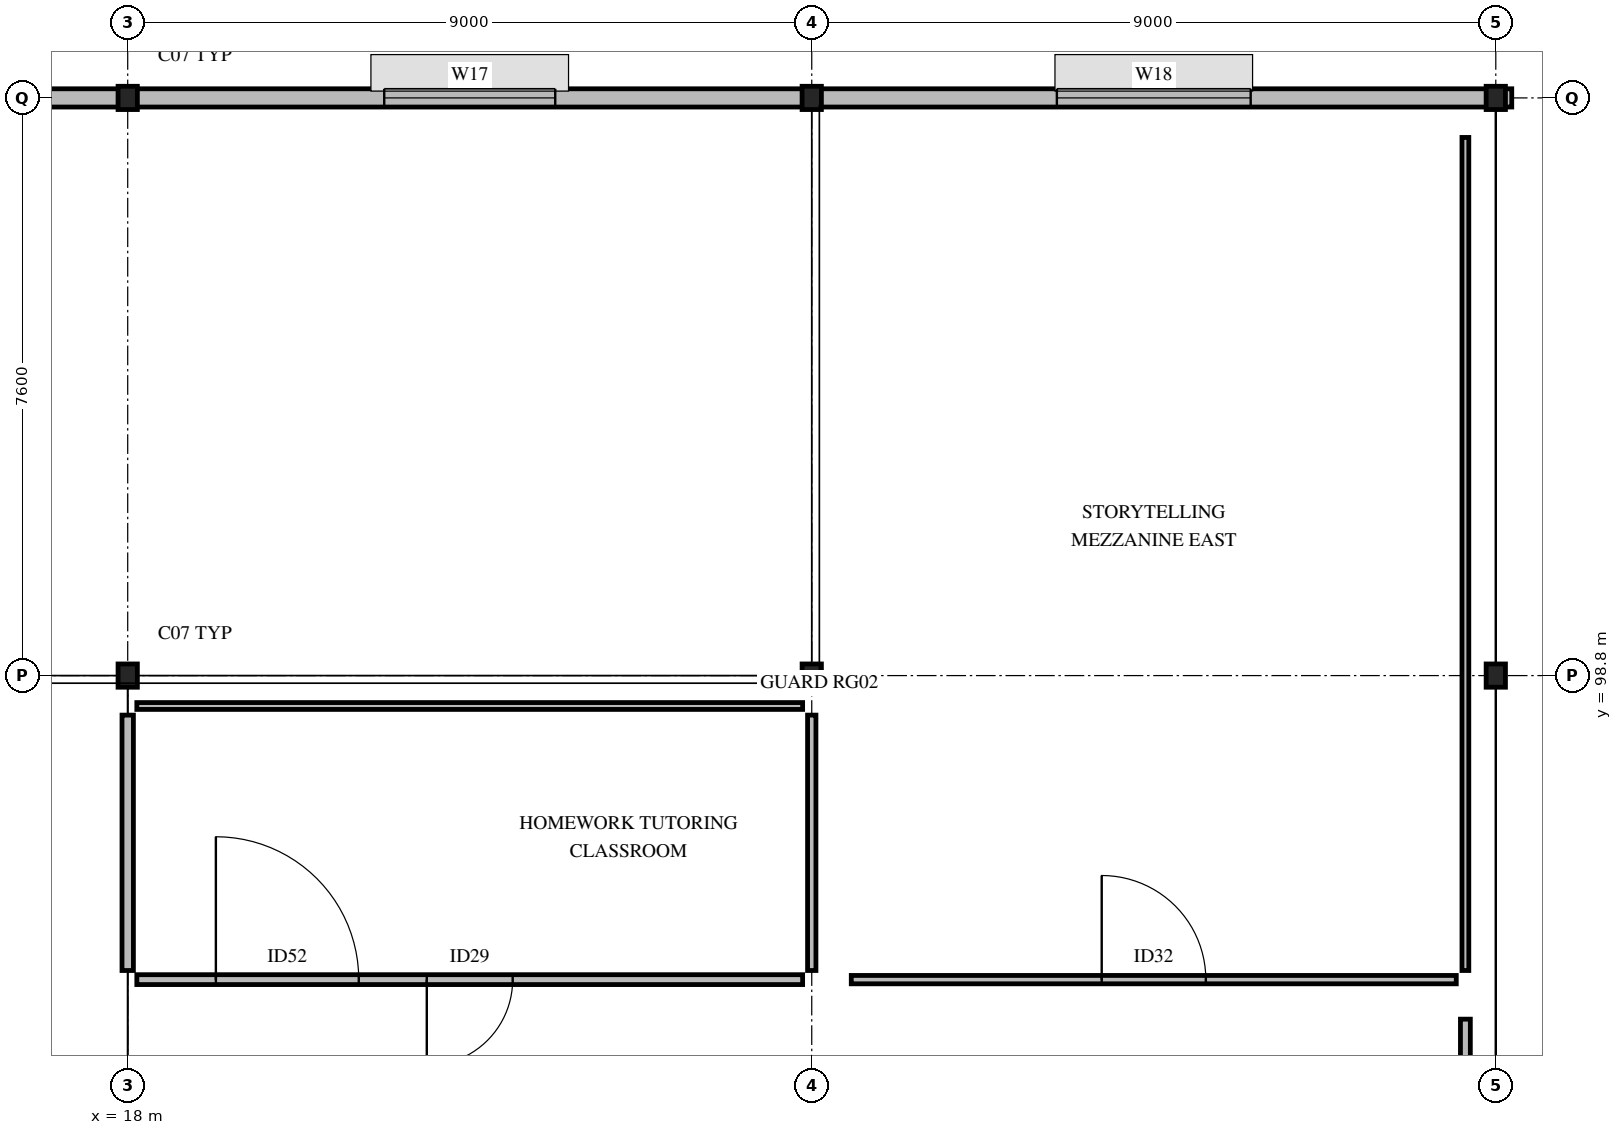
"""IFC4 building model, lengths in metres.
Left out: names, types, materials, properties, quantities, classifications, styles, units other than length and angle.
Written with IfcOpenShell. Run it as: python <this file> out.ifc"""

import sys

from ifc_helpers import new_model, si_unit, direction, frame, frame_2d, origin, origin_2d, place, context, subcontext, project, spatial, rectangle, i_section, extrude, element, fill, save


model = new_model("IFC4")
c1 = context("Model", 3, precision=1e-05, world=origin(), true_north=direction((0.0, 1.0)))
c2 = subcontext(c1, "Body", "Model", "MODEL_VIEW")
j1 = project(units=[si_unit("LENGTHUNIT", "METRE"), si_unit("PLANEANGLEUNIT", "RADIAN")], contexts=[c1])
p1 = place(None, origin())
s1 = spatial("IfcSite", under=j1, at=p1, CompositionType="ELEMENT")
p2 = place(p1, origin())
s2 = spatial("IfcBuilding", under=s1, at=p2, CompositionType="ELEMENT")
p3 = place(p2, frame((0.0, 0.0, 5.04)))
s3 = spatial("IfcBuildingStorey", under=s2, at=p3, CompositionType="ELEMENT", Elevation=5.04)
for number, where, z_axis, x_axis in (
    (1, (18.0, 98.8, 0.0), (0.0, 0.0, 1.0), (1.0, 0.0, 0.0)),
    (2, (18.0, 106.4, 0.0), (0.0, 0.0, 1.0), (1.0, 0.0, 0.0)),
    (3, (27.0, 98.8, 0.0), (0.0, 0.0, 1.0), (1.0, 0.0, 0.0)),
    (4, (27.0, 106.4, 0.0), (0.0, 0.0, 1.0), (1.0, 0.0, 0.0)),
    (5, (36.0, 98.8, 0.0), (0.0, 0.0, 1.0), (1.0, 0.0, 0.0)),
    (6, (36.0, 106.4, 0.0), (0.0, 0.0, 1.0), (1.0, 0.0, 0.0)),
):
    element("IfcColumn", number, at=place(p3, frame(where, z_axis=z_axis, x_axis=x_axis)), inside=s3, PredefinedType="COLUMN", context=c2, shape_type="SweptSolid", body=[
        extrude(i_section(OverallWidth=0.254, OverallDepth=0.306, WebThickness=0.009, FlangeThickness=0.015, FilletRadius=0.015, at=origin_2d()), origin(), (0.0, 0.0, 1.0), 4.32),
    ])
p4 = place(p3, frame((9.0, 106.4, 0.0), z_axis=(0.0, 0.0, 1.0), x_axis=(1.0, 0.0, 0.0)))
e7 = element("IfcWall", 7, at=p4, inside=s3, PredefinedType="STANDARD", context=c2, shape_type="SweptSolid", body=[
    extrude(rectangle(XDim=9.0, YDim=0.24, at=frame_2d((4.5, 0.0))), origin(), (0.0, 0.0, 1.0), 4.08),
])
p5 = place(p4, frame((3.525, 0.0, 0.85)))
e8 = element("IfcOpeningElement", 8, at=p5, cuts=e7, PredefinedType="OPENING", context=c2, shape_type="SweptSolid", body=[
    extrude(rectangle(XDim=1.95, YDim=1.35, at=frame_2d((0.975, 0.675))), frame((0.0, 0.13, 0.0), z_axis=(0.0, -1.0, 0.0), x_axis=(1.0, 0.0, 0.0)), (0.0, 0.0, 1.0), 0.26),
])
p6 = place(p3, frame((18.0, 106.4, 0.0), z_axis=(0.0, 0.0, 1.0), x_axis=(1.0, 0.0, 0.0)))
e9 = element("IfcWall", 9, at=p6, inside=s3, PredefinedType="STANDARD", context=c2, shape_type="SweptSolid", body=[
    extrude(rectangle(XDim=9.0, YDim=0.24, at=frame_2d((4.5, 0.0))), origin(), (0.0, 0.0, 1.0), 4.08),
])
p7 = place(p6, frame((3.375, 0.0, 0.85)))
e10 = element("IfcOpeningElement", 10, at=p7, cuts=e9, PredefinedType="OPENING", context=c2, shape_type="SweptSolid", body=[
    extrude(rectangle(XDim=2.25, YDim=1.35, at=frame_2d((1.125, 0.675))), frame((0.0, 0.13, 0.0), z_axis=(0.0, -1.0, 0.0), x_axis=(1.0, 0.0, 0.0)), (0.0, 0.0, 1.0), 0.26),
])
p8 = place(p3, frame((27.0, 106.4, 0.0), z_axis=(0.0, 0.0, 1.0), x_axis=(1.0, 0.0, 0.0)))
e11 = element("IfcWall", 11, at=p8, inside=s3, PredefinedType="STANDARD", context=c2, shape_type="SweptSolid", body=[
    extrude(rectangle(XDim=9.21, YDim=0.24, at=frame_2d((4.605, 0.0))), origin(), (0.0, 0.0, 1.0), 4.08),
])
p9 = place(p8, frame((3.225, 0.0, 0.85)))
e12 = element("IfcOpeningElement", 12, at=p9, cuts=e11, PredefinedType="OPENING", context=c2, shape_type="SweptSolid", body=[
    extrude(rectangle(XDim=2.55, YDim=1.35, at=frame_2d((1.275, 0.675))), frame((0.0, 0.13, 0.0), z_axis=(0.0, -1.0, 0.0), x_axis=(1.0, 0.0, 0.0)), (0.0, 0.0, 1.0), 0.26),
])
p10 = place(p3, frame((18.12, 94.8, 0.0), z_axis=(0.0, 0.0, 1.0), x_axis=(1.0, 0.0, 0.0)))
e13 = element("IfcWall", 13, at=p10, inside=s3, PredefinedType="PARTITIONING", context=c2, shape_type="SweptSolid", body=[
    extrude(rectangle(XDim=8.76, YDim=0.13, at=frame_2d((4.38, 0.0))), origin(), (0.0, 0.0, 1.0), 4.04),
])
p11 = place(p10, frame((3.815, 0.0, 0.0)))
e14 = element("IfcOpeningElement", 14, at=p11, cuts=e13, PredefinedType="OPENING", context=c2, shape_type="SweptSolid", body=[
    extrude(rectangle(XDim=1.13, YDim=2.15, at=frame_2d((0.565, 1.075))), frame((0.0, 0.075, 0.0), z_axis=(0.0, -1.0, 0.0), x_axis=(1.0, 0.0, 0.0)), (0.0, 0.0, 1.0), 0.15),
])
p12 = place(p10, frame((1.04, 0.0, 0.0)))
e15 = element("IfcOpeningElement", 15, at=p12, cuts=e13, PredefinedType="OPENING", context=c2, shape_type="SweptSolid", body=[
    extrude(rectangle(XDim=1.88, YDim=2.2, at=frame_2d((0.94, 1.1))), frame((0.0, 0.075, 0.0), z_axis=(0.0, -1.0, 0.0), x_axis=(1.0, 0.0, 0.0)), (0.0, 0.0, 1.0), 0.15),
])
p13 = place(p3, frame((27.0, 94.92, 0.0), z_axis=(0.0, 0.0, 1.0), x_axis=(0.0, 1.0, 0.0)))
e16 = element("IfcWall", 16, at=p13, inside=s3, PredefinedType="PARTITIONING", context=c2, shape_type="SweptSolid", body=[
    extrude(rectangle(XDim=3.36, YDim=0.11, at=frame_2d((1.68, 0.0))), origin(), (0.0, 0.0, 1.0), 3.659),
])
p14 = place(p3, frame((18.12, 98.4, 0.0), z_axis=(0.0, 0.0, 1.0), x_axis=(1.0, 0.0, 0.0)))
e17 = element("IfcWall", 17, at=p14, inside=s3, PredefinedType="PARTITIONING", context=c2, shape_type="SweptSolid", body=[
    extrude(rectangle(XDim=8.76, YDim=0.09, at=frame_2d((4.38, 0.0))), origin(), (0.0, 0.0, 1.0), 4.04),
])
p15 = place(p3, frame((18.0, 94.92, 0.0), z_axis=(0.0, 0.0, 1.0), x_axis=(0.0, 1.0, 0.0)))
e18 = element("IfcWall", 18, at=p15, inside=s3, PredefinedType="PARTITIONING", context=c2, shape_type="SweptSolid", body=[
    extrude(rectangle(XDim=3.36, YDim=0.15, at=frame_2d((1.68, 0.0))), origin(), (0.0, 0.0, 1.0), 3.659),
])
p16 = place(p3, frame((27.52, 94.8, 0.0), z_axis=(0.0, 0.0, 1.0), x_axis=(1.0, 0.0, 0.0)))
e19 = element("IfcWall", 19, at=p16, inside=s3, PredefinedType="PARTITIONING", context=c2, shape_type="SweptSolid", body=[
    extrude(rectangle(XDim=7.96, YDim=0.11, at=frame_2d((3.98, 0.0))), origin(), (0.0, 0.0, 1.0), 4.04),
])
p17 = place(p16, frame((3.295, 0.0, 0.0)))
e20 = element("IfcOpeningElement", 20, at=p17, cuts=e19, PredefinedType="OPENING", context=c2, shape_type="SweptSolid", body=[
    extrude(rectangle(XDim=1.37, YDim=2.15, at=frame_2d((0.685, 1.075))), frame((0.0, 0.065, 0.0), z_axis=(0.0, -1.0, 0.0), x_axis=(1.0, 0.0, 0.0)), (0.0, 0.0, 1.0), 0.13),
])
p18 = place(p3, frame((35.6, 94.92, 0.0), z_axis=(0.0, 0.0, 1.0), x_axis=(0.0, 1.0, 0.0)))
e21 = element("IfcWall", 21, at=p18, inside=s3, PredefinedType="PARTITIONING", context=c2, shape_type="SweptSolid", body=[
    extrude(rectangle(XDim=10.96, YDim=0.09, at=frame_2d((5.48, 0.0))), origin(), (0.0, 0.0, 1.0), 4.04),
])
p19 = place(p3, frame((35.6, 91.72, 0.0), z_axis=(0.0, 0.0, 1.0), x_axis=(0.0, 1.0, 0.0)))
e22 = element("IfcWall", 22, at=p19, inside=s3, PredefinedType="PARTITIONING", context=c2, shape_type="SweptSolid", body=[
    extrude(rectangle(XDim=2.56, YDim=0.13, at=frame_2d((1.28, 0.0))), origin(), (0.0, 0.0, 1.0), 4.04),
])
p20 = place(p7, origin())
e23 = element("IfcWindow", 23, at=p20, inside=s3, PartitioningType="SINGLE_PANEL", PredefinedType="WINDOW", context=c2, shape_type="SweptSolid", body=[
    extrude(rectangle(XDim=2.25, YDim=1.35, at=frame_2d((1.125, 0.675))), frame((0.0, 0.03, 0.0), z_axis=(0.0, -1.0, 0.0), x_axis=(1.0, 0.0, 0.0)), (0.0, 0.0, 1.0), 0.06),
])
fill(e10, e23)
p21 = place(p9, origin())
e24 = element("IfcWindow", 24, at=p21, inside=s3, PartitioningType="SINGLE_PANEL", PredefinedType="WINDOW", context=c2, shape_type="SweptSolid", body=[
    extrude(rectangle(XDim=2.55, YDim=1.35, at=frame_2d((1.275, 0.675))), frame((0.0, 0.03, 0.0), z_axis=(0.0, -1.0, 0.0), x_axis=(1.0, 0.0, 0.0)), (0.0, 0.0, 1.0), 0.06),
])
fill(e12, e24)
p22 = place(p11, origin())
e25 = element("IfcDoor", 25, at=p22, inside=s3, OperationType="SINGLE_SWING_RIGHT", PredefinedType="DOOR", context=c2, shape_type="SweptSolid", body=[
    extrude(rectangle(XDim=1.13, YDim=2.15, at=frame_2d((0.565, 1.075))), frame((0.0, 0.025, 0.0), z_axis=(0.0, -1.0, 0.0), x_axis=(1.0, 0.0, 0.0)), (0.0, 0.0, 1.0), 0.05),
])
fill(e14, e25)
p23 = place(p17, origin())
e26 = element("IfcDoor", 26, at=p23, inside=s3, OperationType="SINGLE_SWING_LEFT", PredefinedType="DOOR", context=c2, shape_type="SweptSolid", body=[
    extrude(rectangle(XDim=1.37, YDim=2.15, at=frame_2d((0.685, 1.075))), frame((0.0, 0.025, 0.0), z_axis=(0.0, -1.0, 0.0), x_axis=(1.0, 0.0, 0.0)), (0.0, 0.0, 1.0), 0.05),
])
fill(e20, e26)
p24 = place(p12, origin())
e27 = element("IfcDoor", 27, at=p24, inside=s3, OperationType="SINGLE_SWING_LEFT", PredefinedType="DOOR", context=c2, shape_type="SweptSolid", body=[
    extrude(rectangle(XDim=1.88, YDim=2.2, at=frame_2d((0.94, 1.1))), frame((0.0, 0.025, 0.0), z_axis=(0.0, -1.0, 0.0), x_axis=(1.0, 0.0, 0.0)), (0.0, 0.0, 1.0), 0.05),
])
fill(e15, e27)
save(model, sys.argv[1])
